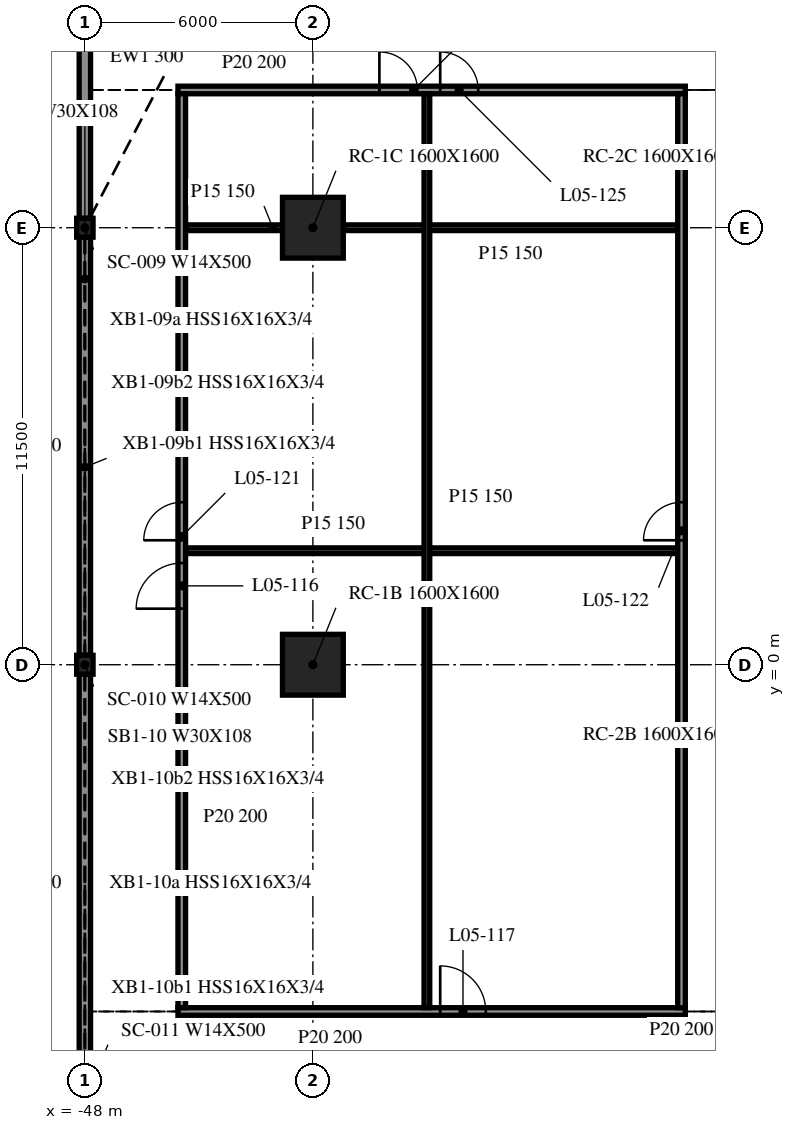
"""IFC4 building model, lengths in metres.
Left out: names, types, materials, properties, quantities, classifications, styles, units other than length and angle.
Written with IfcOpenShell. Run it as: python <this file> out.ifc"""

import sys

from ifc_helpers import new_model, si_unit, direction, frame, frame_2d, origin, origin_2d, place, context, subcontext, project, spatial, rectangle, i_section, extrude, element, fill, save


model = new_model("IFC4")
c1 = context("Model", 3, precision=1e-05, world=origin(), true_north=direction((0.0, 1.0)))
c2 = subcontext(c1, "Body", "Model", "MODEL_VIEW")
j1 = project(units=[si_unit("LENGTHUNIT", "METRE"), si_unit("PLANEANGLEUNIT", "RADIAN")], contexts=[c1])
p1 = place(None, origin())
s1 = spatial("IfcSite", under=j1, at=p1, CompositionType="ELEMENT")
p2 = place(p1, origin())
s2 = spatial("IfcBuilding", under=s1, at=p2, CompositionType="ELEMENT")
p3 = place(p2, frame((0.0, 0.0, 24.4)))
s3 = spatial("IfcBuildingStorey", under=s2, at=p3, CompositionType="ELEMENT", Elevation=24.4)
for number, where, z_axis, x_axis in (
    (1, (-42.0, 0.0, -0.34), (0.0, 0.0, 1.0), (1.0, 0.0, 0.0)),
    (2, (-42.0, 11.5, -0.34), (0.0, 0.0, 1.0), (1.0, 0.0, 0.0)),
):
    element("IfcColumn", number, at=place(p3, frame(where, z_axis=z_axis, x_axis=x_axis)), inside=s3, PredefinedType="COLUMN", context=c2, shape_type="SweptSolid", body=[
        extrude(rectangle(XDim=1.6, YDim=1.6, at=origin_2d()), origin(), (0.0, 0.0, 1.0), 4.3),
    ])
for number, where, z_axis, x_axis in (
    (3, (-48.0, 11.5, -0.34), (0.0, 0.0, 1.0), (1.0, 0.0, 0.0)),
    (4, (-48.0, 0.0, -0.34), (0.0, 0.0, 1.0), (1.0, 0.0, 0.0)),
):
    element("IfcColumn", number, at=place(p3, frame(where, z_axis=z_axis, x_axis=x_axis)), inside=s3, PredefinedType="COLUMN", context=c2, shape_type="SweptSolid", body=[
        extrude(i_section(OverallWidth=0.432, OverallDepth=0.498, WebThickness=0.056, FlangeThickness=0.089, at=origin_2d()), origin(), (0.0, 0.0, 1.0), 4.3),
    ])
p4 = place(p3, frame((-48.0, 17.0, 0.0), z_axis=(0.0, 0.0, 1.0), x_axis=(0.0, -1.0, 0.0)))
e5 = element("IfcWall", 5, at=p4, inside=s3, PredefinedType="NOTDEFINED", context=c2, shape_type="SweptSolid", body=[
    extrude(rectangle(XDim=5.251, YDim=0.3, at=frame_2d((2.625, 0.0))), origin(), (0.0, 0.0, 1.0), 3.203),
])
for number, where, z_axis, x_axis in (
    (6, (-48.0, 11.251, 0.0), (0.0, 0.0, 1.0), (0.0, -1.0, 0.0)),
    (7, (-48.0, -0.249, 0.0), (0.0, 0.0, 1.0), (0.0, -1.0, 0.0)),
):
    element("IfcWall", number, at=place(p3, frame(where, z_axis=z_axis, x_axis=x_axis)), inside=s3, PredefinedType="NOTDEFINED", context=c2, shape_type="SweptSolid", body=[
        extrude(rectangle(XDim=11.002, YDim=0.3, at=frame_2d((5.501, 0.0))), origin(), (0.0, 0.0, 1.0), 3.203),
    ])
p5 = place(p3, frame((-45.55, -9.125, 0.0), z_axis=(0.0, 0.0, 1.0), x_axis=(1.0, 0.0, 0.0)))
e8 = element("IfcWall", 8, at=p5, inside=s3, PredefinedType="PARTITIONING", context=c2, shape_type="SweptSolid", body=[
    extrude(rectangle(XDim=13.35, YDim=0.2, at=frame_2d((6.675, 0.0))), origin(), (0.0, 0.0, 1.0), 3.96),
])
p6 = place(p5, frame((6.9, 0.0, 0.0)))
e9 = element("IfcOpeningElement", 9, at=p6, cuts=e8, PredefinedType="OPENING", context=c2, shape_type="SweptSolid", body=[
    extrude(rectangle(XDim=1.2, YDim=2.1, at=frame_2d((0.6, 1.05))), frame((0.0, 0.11, 0.0), z_axis=(0.0, -1.0, 0.0), x_axis=(1.0, 0.0, 0.0)), (0.0, 0.0, 1.0), 0.22),
])
p7 = place(p3, frame((-45.35, 3.0, 0.0), z_axis=(0.0, 0.0, 1.0), x_axis=(1.0, 0.0, 0.0)))
e10 = element("IfcWall", 10, at=p7, inside=s3, PredefinedType="PARTITIONING", context=c2, shape_type="SweptSolid", body=[
    extrude(rectangle(XDim=12.95, YDim=0.15, at=frame_2d((6.475, 0.0))), origin(), (0.0, 0.0, 1.0), 3.96),
])
p8 = place(p3, frame((-45.35, 11.5, 0.0), z_axis=(0.0, 0.0, 1.0), x_axis=(1.0, 0.0, 0.0)))
e11 = element("IfcWall", 11, at=p8, inside=s3, PredefinedType="PARTITIONING", context=c2, shape_type="SweptSolid", body=[
    extrude(rectangle(XDim=2.55, YDim=0.15, at=frame_2d((1.275, 0.0))), origin(), (0.0, 0.0, 1.0), 3.96),
])
p9 = place(p3, frame((-41.2, 11.5, 0.0), z_axis=(0.0, 0.0, 1.0), x_axis=(1.0, 0.0, 0.0)))
e12 = element("IfcWall", 12, at=p9, inside=s3, PredefinedType="PARTITIONING", context=c2, shape_type="SweptSolid", body=[
    extrude(rectangle(XDim=8.8, YDim=0.15, at=frame_2d((4.4, 0.0))), origin(), (0.0, 0.0, 1.0), 3.96),
])
p10 = place(p3, frame((-45.55, 15.125, 0.0), z_axis=(0.0, 0.0, 1.0), x_axis=(1.0, 0.0, 0.0)))
e13 = element("IfcWall", 13, at=p10, inside=s3, PredefinedType="PARTITIONING", context=c2, shape_type="SweptSolid", body=[
    extrude(rectangle(XDim=13.35, YDim=0.2, at=frame_2d((6.675, 0.0))), origin(), (0.0, 0.0, 1.0), 3.96),
])
p11 = place(p10, frame((5.3, 0.0, 0.0)))
e14 = element("IfcOpeningElement", 14, at=p11, cuts=e13, PredefinedType="OPENING", context=c2, shape_type="SweptSolid", body=[
    extrude(rectangle(XDim=1.0, YDim=2.1, at=frame_2d((0.5, 1.05))), frame((0.0, 0.11, 0.0), z_axis=(0.0, -1.0, 0.0), x_axis=(1.0, 0.0, 0.0)), (0.0, 0.0, 1.0), 0.22),
])
p12 = place(p10, frame((6.9, 0.0, 0.0)))
e15 = element("IfcOpeningElement", 15, at=p12, cuts=e13, PredefinedType="OPENING", context=c2, shape_type="SweptSolid", body=[
    extrude(rectangle(XDim=1.0, YDim=2.1, at=frame_2d((0.5, 1.05))), frame((0.0, 0.11, 0.0), z_axis=(0.0, -1.0, 0.0), x_axis=(1.0, 0.0, 0.0)), (0.0, 0.0, 1.0), 0.22),
])
p13 = place(p3, frame((-45.45, -9.025, 0.0), z_axis=(0.0, 0.0, 1.0), x_axis=(0.0, 1.0, 0.0)))
e16 = element("IfcWall", 16, at=p13, inside=s3, PredefinedType="PARTITIONING", context=c2, shape_type="SweptSolid", body=[
    extrude(rectangle(XDim=24.05, YDim=0.2, at=frame_2d((12.025, 0.0))), origin(), (0.0, 0.0, 1.0), 3.96),
])
p14 = place(p13, frame((10.5, 0.0, 0.0)))
e17 = element("IfcOpeningElement", 17, at=p14, cuts=e16, PredefinedType="OPENING", context=c2, shape_type="SweptSolid", body=[
    extrude(rectangle(XDim=1.2, YDim=2.1, at=frame_2d((0.6, 1.05))), frame((0.0, 0.11, 0.0), z_axis=(0.0, -1.0, 0.0), x_axis=(1.0, 0.0, 0.0)), (0.0, 0.0, 1.0), 0.22),
])
p15 = place(p13, frame((12.3, 0.0, 0.0)))
e18 = element("IfcOpeningElement", 18, at=p15, cuts=e16, PredefinedType="OPENING", context=c2, shape_type="SweptSolid", body=[
    extrude(rectangle(XDim=1.0, YDim=2.1, at=frame_2d((0.5, 1.05))), frame((0.0, 0.11, 0.0), z_axis=(0.0, -1.0, 0.0), x_axis=(1.0, 0.0, 0.0)), (0.0, 0.0, 1.0), 0.22),
])
p16 = place(p3, frame((-39.0, -9.025, 0.0), z_axis=(0.0, 0.0, 1.0), x_axis=(0.0, 1.0, 0.0)))
e19 = element("IfcWall", 19, at=p16, inside=s3, PredefinedType="PARTITIONING", context=c2, shape_type="SweptSolid", body=[
    extrude(rectangle(XDim=24.05, YDim=0.15, at=frame_2d((12.025, 0.0))), origin(), (0.0, 0.0, 1.0), 3.96),
])
p17 = place(p3, frame((-32.3, -9.025, 0.0), z_axis=(0.0, 0.0, 1.0), x_axis=(0.0, 1.0, 0.0)))
e20 = element("IfcWall", 20, at=p17, inside=s3, PredefinedType="PARTITIONING", context=c2, shape_type="SweptSolid", body=[
    extrude(rectangle(XDim=24.05, YDim=0.2, at=frame_2d((12.025, 0.0))), origin(), (0.0, 0.0, 1.0), 3.96),
])
p18 = place(p17, frame((12.3, 0.0, 0.0)))
e21 = element("IfcOpeningElement", 21, at=p18, cuts=e20, PredefinedType="OPENING", context=c2, shape_type="SweptSolid", body=[
    extrude(rectangle(XDim=1.0, YDim=2.1, at=frame_2d((0.5, 1.05))), frame((0.0, 0.11, 0.0), z_axis=(0.0, -1.0, 0.0), x_axis=(1.0, 0.0, 0.0)), (0.0, 0.0, 1.0), 0.22),
])
p19 = place(p14, origin())
e22 = element("IfcDoor", 22, at=p19, inside=s3, OperationType="SINGLE_SWING_RIGHT", PredefinedType="DOOR", context=c2, shape_type="SweptSolid", body=[
    extrude(rectangle(XDim=1.2, YDim=2.1, at=frame_2d((0.6, 1.05))), frame((0.0, 0.025, 0.0), z_axis=(0.0, -1.0, 0.0), x_axis=(1.0, 0.0, 0.0)), (0.0, 0.0, 1.0), 0.05),
])
fill(e17, e22)
p20 = place(p6, origin())
e23 = element("IfcDoor", 23, at=p20, inside=s3, OperationType="SINGLE_SWING_RIGHT", PredefinedType="DOOR", context=c2, shape_type="SweptSolid", body=[
    extrude(rectangle(XDim=1.2, YDim=2.1, at=frame_2d((0.6, 1.05))), frame((0.0, 0.025, 0.0), z_axis=(0.0, -1.0, 0.0), x_axis=(1.0, 0.0, 0.0)), (0.0, 0.0, 1.0), 0.05),
])
fill(e9, e23)
p21 = place(p15, origin())
e24 = element("IfcDoor", 24, at=p21, inside=s3, OperationType="SINGLE_SWING_LEFT", PredefinedType="DOOR", context=c2, shape_type="SweptSolid", body=[
    extrude(rectangle(XDim=1.0, YDim=2.1, at=frame_2d((0.5, 1.05))), frame((0.0, 0.025, 0.0), z_axis=(0.0, -1.0, 0.0), x_axis=(1.0, 0.0, 0.0)), (0.0, 0.0, 1.0), 0.05),
])
fill(e18, e24)
p22 = place(p18, origin())
e25 = element("IfcDoor", 25, at=p22, inside=s3, OperationType="SINGLE_SWING_RIGHT", PredefinedType="DOOR", context=c2, shape_type="SweptSolid", body=[
    extrude(rectangle(XDim=1.0, YDim=2.1, at=frame_2d((0.5, 1.05))), frame((0.0, 0.025, 0.0), z_axis=(0.0, -1.0, 0.0), x_axis=(1.0, 0.0, 0.0)), (0.0, 0.0, 1.0), 0.05),
])
fill(e21, e25)
p23 = place(p11, origin())
e26 = element("IfcDoor", 26, at=p23, inside=s3, OperationType="SINGLE_SWING_RIGHT", PredefinedType="DOOR", context=c2, shape_type="SweptSolid", body=[
    extrude(rectangle(XDim=1.0, YDim=2.1, at=frame_2d((0.5, 1.05))), frame((0.0, 0.025, 0.0), z_axis=(0.0, -1.0, 0.0), x_axis=(1.0, 0.0, 0.0)), (0.0, 0.0, 1.0), 0.05),
])
fill(e14, e26)
p24 = place(p12, origin())
e27 = element("IfcDoor", 27, at=p24, inside=s3, OperationType="SINGLE_SWING_LEFT", PredefinedType="DOOR", context=c2, shape_type="SweptSolid", body=[
    extrude(rectangle(XDim=1.0, YDim=2.1, at=frame_2d((0.5, 1.05))), frame((0.0, 0.025, 0.0), z_axis=(0.0, -1.0, 0.0), x_axis=(1.0, 0.0, 0.0)), (0.0, 0.0, 1.0), 0.05),
])
fill(e15, e27)
save(model, sys.argv[1])
